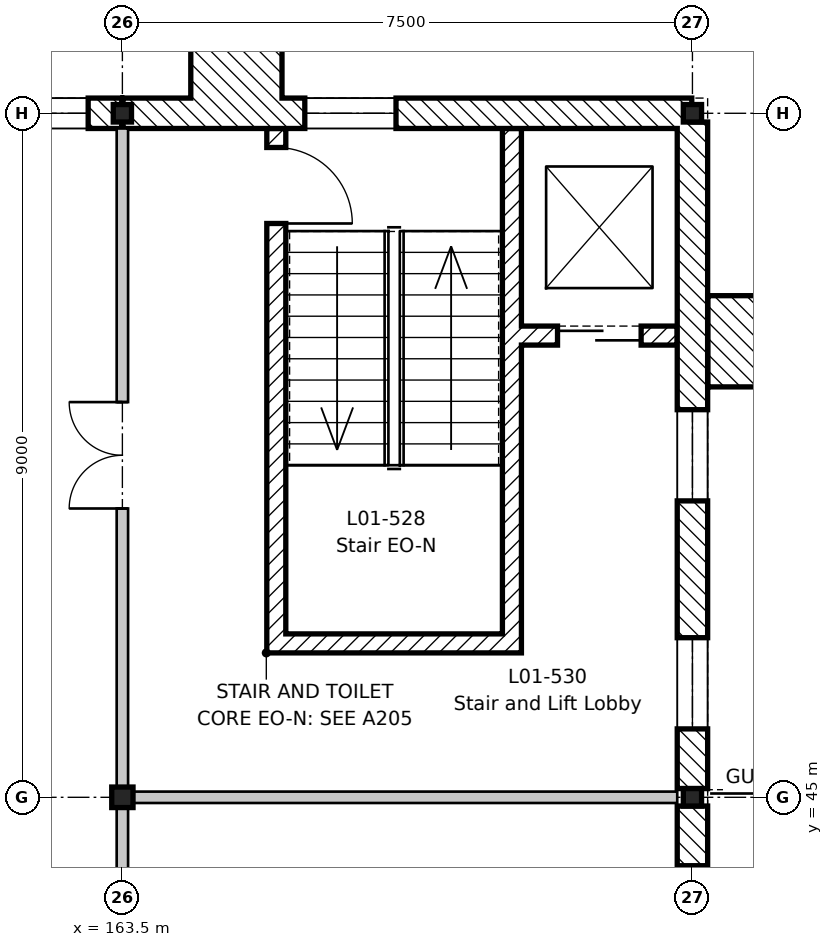
"""IFC4 building model, lengths in metres.
Left out: names, types, materials, properties, quantities, classifications, styles, units other than length and angle.
Written with IfcOpenShell. Run it as: python <this file> out.ifc"""

import sys

from ifc_helpers import new_model, si_unit, direction, frame, frame_2d, origin, origin_2d, place, context, subcontext, project, spatial, rectangle, i_section, extrude, element, fill, save


model = new_model("IFC4")
c1 = context("Model", 3, precision=1e-05, world=origin(), true_north=direction((0.0, 1.0)))
c2 = subcontext(c1, "Body", "Model", "MODEL_VIEW")
j1 = project(units=[si_unit("LENGTHUNIT", "METRE"), si_unit("PLANEANGLEUNIT", "RADIAN")], contexts=[c1])
p1 = place(None, origin())
s1 = spatial("IfcSite", under=j1, at=p1, CompositionType="ELEMENT")
p2 = place(p1, origin())
s2 = spatial("IfcBuilding", under=s1, at=p2, CompositionType="ELEMENT")
p3 = place(p2, frame((0.0, 0.0, 5.4)))
s3 = spatial("IfcBuildingStorey", under=s2, at=p3, CompositionType="ELEMENT", Elevation=5.4)
p4 = place(p3, frame((163.5, 45.0, -0.2), z_axis=(0.0, 0.0, 1.0), x_axis=(1.0, 0.0, 0.0)))
e1 = element("IfcColumn", 1, at=p4, inside=s3, PredefinedType="COLUMN", context=c2, shape_type="SweptSolid", body=[
    extrude(i_section(OverallWidth=0.28, OverallDepth=0.27, WebThickness=0.008, FlangeThickness=0.013, FilletRadius=0.024, at=origin_2d()), origin(), (0.0, 0.0, 1.0), 4.5),
])
for number, where, z_axis, x_axis in (
    (2, (163.5, 54.0, -0.2), (0.0, 0.0, 1.0), (1.0, 0.0, 0.0)),
    (3, (171.0, 45.0, -0.2), (0.0, 0.0, 1.0), (1.0, 0.0, 0.0)),
    (4, (171.0, 54.0, -0.2), (0.0, 0.0, 1.0), (1.0, 0.0, 0.0)),
):
    element("IfcColumn", number, at=place(p3, frame(where, z_axis=z_axis, x_axis=x_axis)), inside=s3, PredefinedType="COLUMN", context=c2, shape_type="SweptSolid", body=[
        extrude(i_section(OverallWidth=0.24, OverallDepth=0.23, WebThickness=0.008, FlangeThickness=0.012, FilletRadius=0.021, at=origin_2d()), origin(), (0.0, 0.0, 1.0), 4.5),
    ])
p5 = place(p3, frame((168.625, 46.9, 0.0), z_axis=(0.0, 0.0, 1.0), x_axis=(0.0, 1.0, 0.0)))
e5 = element("IfcWall", 5, at=p5, inside=s3, PredefinedType="SHEAR", context=c2, shape_type="SweptSolid", body=[
    extrude(rectangle(XDim=6.9, YDim=0.25, at=frame_2d((3.45, 0.0))), origin(), (0.0, 0.0, 1.0), 4.3),
])
p6 = place(p3, frame((165.525, 46.9, 0.0), z_axis=(0.0, 0.0, 1.0), x_axis=(0.0, 1.0, 0.0)))
e6 = element("IfcWall", 6, at=p6, inside=s3, PredefinedType="SHEAR", context=c2, shape_type="SweptSolid", body=[
    extrude(rectangle(XDim=6.9, YDim=0.25, at=frame_2d((3.45, 0.0))), origin(), (0.0, 0.0, 1.0), 4.3),
])
p7 = place(p6, frame((5.65, 0.0, 0.0)))
e7 = element("IfcOpeningElement", 7, at=p7, cuts=e6, PredefinedType="OPENING", context=c2, shape_type="SweptSolid", body=[
    extrude(rectangle(XDim=1.0, YDim=2.1, at=frame_2d((0.5, 1.05))), frame((0.0, 0.135, 0.0), z_axis=(0.0, -1.0, 0.0), x_axis=(1.0, 0.0, 0.0)), (0.0, 0.0, 1.0), 0.27),
])
p8 = place(p3, frame((165.65, 47.025, 0.0), z_axis=(0.0, 0.0, 1.0), x_axis=(1.0, 0.0, 0.0)))
e8 = element("IfcWall", 8, at=p8, inside=s3, PredefinedType="SHEAR", context=c2, shape_type="SweptSolid", body=[
    extrude(rectangle(XDim=2.85, YDim=0.25, at=frame_2d((1.425, 0.0))), origin(), (0.0, 0.0, 1.0), 4.3),
])
p9 = place(p3, frame((168.75, 51.075, 0.0), z_axis=(0.0, 0.0, 1.0), x_axis=(1.0, 0.0, 0.0)))
e9 = element("IfcWall", 9, at=p9, inside=s3, PredefinedType="SHEAR", context=c2, shape_type="SweptSolid", body=[
    extrude(rectangle(XDim=2.05, YDim=0.25, at=frame_2d((1.025, 0.0))), origin(), (0.0, 0.0, 1.0), 4.3),
])
p10 = place(p9, frame((0.475, 0.0, 0.0)))
e10 = element("IfcOpeningElement", 10, at=p10, cuts=e9, PredefinedType="OPENING", context=c2, shape_type="SweptSolid", body=[
    extrude(rectangle(XDim=1.1, YDim=2.1, at=frame_2d((0.55, 1.05))), frame((0.0, 0.135, 0.0), z_axis=(0.0, -1.0, 0.0), x_axis=(1.0, 0.0, 0.0)), (0.0, 0.0, 1.0), 0.27),
])
p11 = place(p3, frame((160.509, 54.0, 0.0), z_axis=(0.0, 0.0, 1.0), x_axis=(1.0, 0.0, 0.0)))
e11 = element("IfcWall", 11, at=p11, inside=s3, PredefinedType="STANDARD", context=c2, shape_type="SweptSolid", body=[
    extrude(rectangle(XDim=2.982, YDim=0.4, at=frame_2d((1.491, 0.0))), origin(), (0.0, 0.0, 1.0), 4.1),
])
p12 = place(p11, frame((0.441, 0.0, 0.9)))
e12 = element("IfcOpeningElement", 12, at=p12, cuts=e11, PredefinedType="OPENING", context=c2, shape_type="SweptSolid", body=[
    extrude(rectangle(XDim=2.1, YDim=2.1, at=frame_2d((1.05, 1.05))), frame((0.0, 0.21, 0.0), z_axis=(0.0, -1.0, 0.0), x_axis=(1.0, 0.0, 0.0)), (0.0, 0.0, 1.0), 0.42),
])
p13 = place(p3, frame((163.509, 54.0, 0.0), z_axis=(0.0, 0.0, 1.0), x_axis=(1.0, 0.0, 0.0)))
e13 = element("IfcWall", 13, at=p13, inside=s3, PredefinedType="STANDARD", context=c2, shape_type="SweptSolid", body=[
    extrude(rectangle(XDim=7.482, YDim=0.4, at=frame_2d((3.741, 0.0))), origin(), (0.0, 0.0, 1.0), 3.97),
])
p14 = place(p13, frame((2.391, 0.0, 0.9)))
e14 = element("IfcOpeningElement", 14, at=p14, cuts=e13, PredefinedType="OPENING", context=c2, shape_type="SweptSolid", body=[
    extrude(rectangle(XDim=1.2, YDim=2.7, at=frame_2d((0.6, 1.35))), frame((0.0, 0.21, 0.0), z_axis=(0.0, -1.0, 0.0), x_axis=(1.0, 0.0, 0.0)), (0.0, 0.0, 1.0), 0.42),
])
p15 = place(p3, frame((171.0, 44.885, 0.0), z_axis=(0.0, 0.0, 1.0), x_axis=(0.0, -1.0, 0.0)))
e15 = element("IfcWall", 15, at=p15, inside=s3, PredefinedType="STANDARD", context=c2, shape_type="SweptSolid", body=[
    extrude(rectangle(XDim=8.77, YDim=0.4, at=frame_2d((4.385, 0.0))), origin(), (0.0, 0.0, 1.0), 3.9),
])
p16 = place(p15, frame((6.785, 0.0, 0.9)))
e16 = element("IfcOpeningElement", 16, at=p16, cuts=e15, PredefinedType="OPENING", context=c2, shape_type="SweptSolid", body=[
    extrude(rectangle(XDim=1.2, YDim=2.4, at=frame_2d((0.6, 1.2))), frame((0.0, 0.21, 0.0), z_axis=(0.0, -1.0, 0.0), x_axis=(1.0, 0.0, 0.0)), (0.0, 0.0, 1.0), 0.42),
])
p17 = place(p15, frame((3.785, 0.0, 0.9)))
e17 = element("IfcOpeningElement", 17, at=p17, cuts=e15, PredefinedType="OPENING", context=c2, shape_type="SweptSolid", body=[
    extrude(rectangle(XDim=1.2, YDim=2.4, at=frame_2d((0.6, 1.2))), frame((0.0, 0.21, 0.0), z_axis=(0.0, -1.0, 0.0), x_axis=(1.0, 0.0, 0.0)), (0.0, 0.0, 1.0), 0.42),
])
p18 = place(p15, frame((0.785, 0.0, 0.9)))
e18 = element("IfcOpeningElement", 18, at=p18, cuts=e15, PredefinedType="OPENING", context=c2, shape_type="SweptSolid", body=[
    extrude(rectangle(XDim=1.2, YDim=2.4, at=frame_2d((0.6, 1.2))), frame((0.0, 0.21, 0.0), z_axis=(0.0, -1.0, 0.0), x_axis=(1.0, 0.0, 0.0)), (0.0, 0.0, 1.0), 0.42),
])
p19 = place(p3, frame((171.0, 53.885, 0.0), z_axis=(0.0, 0.0, 1.0), x_axis=(0.0, -1.0, 0.0)))
e19 = element("IfcWall", 19, at=p19, inside=s3, PredefinedType="STANDARD", context=c2, shape_type="SweptSolid", body=[
    extrude(rectangle(XDim=8.77, YDim=0.4, at=frame_2d((4.385, 0.0))), origin(), (0.0, 0.0, 1.0), 3.9),
])
p20 = place(p19, frame((6.785, 0.0, 0.9)))
e20 = element("IfcOpeningElement", 20, at=p20, cuts=e19, PredefinedType="OPENING", context=c2, shape_type="SweptSolid", body=[
    extrude(rectangle(XDim=1.2, YDim=2.4, at=frame_2d((0.6, 1.2))), frame((0.0, 0.21, 0.0), z_axis=(0.0, -1.0, 0.0), x_axis=(1.0, 0.0, 0.0)), (0.0, 0.0, 1.0), 0.42),
])
p21 = place(p19, frame((3.785, 0.0, 0.9)))
e21 = element("IfcOpeningElement", 21, at=p21, cuts=e19, PredefinedType="OPENING", context=c2, shape_type="SweptSolid", body=[
    extrude(rectangle(XDim=1.2, YDim=2.4, at=frame_2d((0.6, 1.2))), frame((0.0, 0.21, 0.0), z_axis=(0.0, -1.0, 0.0), x_axis=(1.0, 0.0, 0.0)), (0.0, 0.0, 1.0), 0.42),
])
for number, where, z_axis, x_axis in (
    (22, (164.4, 54.8, 0.0), (0.0, 0.0, 1.0), (1.0, 0.0, 0.0)),
    (23, (171.8, 50.4, 0.0), (0.0, 0.0, 1.0), (0.0, 1.0, 0.0)),
):
    element("IfcWall", number, at=place(p3, frame(where, z_axis=z_axis, x_axis=x_axis)), inside=s3, PredefinedType="STANDARD", context=c2, shape_type="SweptSolid", body=[
        extrude(rectangle(XDim=1.2, YDim=1.2, at=frame_2d((0.6, 0.0))), origin(), (0.0, 0.0, 1.0), 4.5),
    ])
p22 = place(p3, frame((163.575, 45.0, 0.0), z_axis=(0.0, 0.0, 1.0), x_axis=(1.0, 0.0, 0.0)))
e24 = element("IfcWall", 24, at=p22, inside=s3, PredefinedType="PARTITIONING", context=c2, shape_type="SweptSolid", body=[
    extrude(rectangle(XDim=7.225, YDim=0.15, at=frame_2d((3.613, 0.0))), origin(), (0.0, 0.0, 1.0), 3.95),
])
p23 = place(p3, frame((163.5, -8.8, 0.0), z_axis=(0.0, 0.0, 1.0), x_axis=(0.0, 1.0, 0.0)))
e25 = element("IfcWall", 25, at=p23, inside=s3, PredefinedType="PARTITIONING", context=c2, shape_type="SweptSolid", body=[
    extrude(rectangle(XDim=62.6, YDim=0.15, at=frame_2d((31.3, 0.0))), origin(), (0.0, 0.0, 1.0), 3.78),
])
p24 = place(p23, frame((18.8, 0.0, 0.0)))
e26 = element("IfcOpeningElement", 26, at=p24, cuts=e25, PredefinedType="OPENING", context=c2, shape_type="SweptSolid", body=[
    extrude(rectangle(XDim=1.0, YDim=2.1, at=frame_2d((0.5, 1.05))), frame((0.0, 0.085, 0.0), z_axis=(0.0, -1.0, 0.0), x_axis=(1.0, 0.0, 0.0)), (0.0, 0.0, 1.0), 0.17),
])
p25 = place(p23, frame((23.3, 0.0, 0.0)))
e27 = element("IfcOpeningElement", 27, at=p25, cuts=e25, PredefinedType="OPENING", context=c2, shape_type="SweptSolid", body=[
    extrude(rectangle(XDim=1.0, YDim=2.1, at=frame_2d((0.5, 1.05))), frame((0.0, 0.085, 0.0), z_axis=(0.0, -1.0, 0.0), x_axis=(1.0, 0.0, 0.0)), (0.0, 0.0, 1.0), 0.17),
])
p26 = place(p23, frame((29.3, 0.0, 0.0)))
e28 = element("IfcOpeningElement", 28, at=p26, cuts=e25, PredefinedType="OPENING", context=c2, shape_type="SweptSolid", body=[
    extrude(rectangle(XDim=1.0, YDim=2.1, at=frame_2d((0.5, 1.05))), frame((0.0, 0.085, 0.0), z_axis=(0.0, -1.0, 0.0), x_axis=(1.0, 0.0, 0.0)), (0.0, 0.0, 1.0), 0.17),
])
p27 = place(p23, frame((33.8, 0.0, 0.0)))
e29 = element("IfcOpeningElement", 29, at=p27, cuts=e25, PredefinedType="OPENING", context=c2, shape_type="SweptSolid", body=[
    extrude(rectangle(XDim=1.0, YDim=2.1, at=frame_2d((0.5, 1.05))), frame((0.0, 0.085, 0.0), z_axis=(0.0, -1.0, 0.0), x_axis=(1.0, 0.0, 0.0)), (0.0, 0.0, 1.0), 0.17),
])
p28 = place(p23, frame((45.8, 0.0, 0.0)))
e30 = element("IfcOpeningElement", 30, at=p28, cuts=e25, PredefinedType="OPENING", context=c2, shape_type="SweptSolid", body=[
    extrude(rectangle(XDim=1.0, YDim=2.1, at=frame_2d((0.5, 1.05))), frame((0.0, 0.085, 0.0), z_axis=(0.0, -1.0, 0.0), x_axis=(1.0, 0.0, 0.0)), (0.0, 0.0, 1.0), 0.17),
])
p29 = place(p23, frame((48.8, 0.0, 0.0)))
e31 = element("IfcOpeningElement", 31, at=p29, cuts=e25, PredefinedType="OPENING", context=c2, shape_type="SweptSolid", body=[
    extrude(rectangle(XDim=1.0, YDim=2.1, at=frame_2d((0.5, 1.05))), frame((0.0, 0.085, 0.0), z_axis=(0.0, -1.0, 0.0), x_axis=(1.0, 0.0, 0.0)), (0.0, 0.0, 1.0), 0.17),
])
p30 = place(p23, frame((51.8, 0.0, 0.0)))
e32 = element("IfcOpeningElement", 32, at=p30, cuts=e25, PredefinedType="OPENING", context=c2, shape_type="SweptSolid", body=[
    extrude(rectangle(XDim=1.0, YDim=2.1, at=frame_2d((0.5, 1.05))), frame((0.0, 0.085, 0.0), z_axis=(0.0, -1.0, 0.0), x_axis=(1.0, 0.0, 0.0)), (0.0, 0.0, 1.0), 0.17),
])
p31 = place(p23, frame((12.6, 0.0, 0.0)))
e33 = element("IfcOpeningElement", 33, at=p31, cuts=e25, PredefinedType="OPENING", context=c2, shape_type="SweptSolid", body=[
    extrude(rectangle(XDim=1.4, YDim=2.1, at=frame_2d((0.7, 1.05))), frame((0.0, 0.085, 0.0), z_axis=(0.0, -1.0, 0.0), x_axis=(1.0, 0.0, 0.0)), (0.0, 0.0, 1.0), 0.17),
])
p32 = place(p23, frame((3.6, 0.0, 0.0)))
e34 = element("IfcOpeningElement", 34, at=p32, cuts=e25, PredefinedType="OPENING", context=c2, shape_type="SweptSolid", body=[
    extrude(rectangle(XDim=1.4, YDim=2.1, at=frame_2d((0.7, 1.05))), frame((0.0, 0.085, 0.0), z_axis=(0.0, -1.0, 0.0), x_axis=(1.0, 0.0, 0.0)), (0.0, 0.0, 1.0), 0.17),
])
p33 = place(p23, frame((57.6, 0.0, 0.0)))
e35 = element("IfcOpeningElement", 35, at=p33, cuts=e25, PredefinedType="OPENING", context=c2, shape_type="SweptSolid", body=[
    extrude(rectangle(XDim=1.4, YDim=2.1, at=frame_2d((0.7, 1.05))), frame((0.0, 0.085, 0.0), z_axis=(0.0, -1.0, 0.0), x_axis=(1.0, 0.0, 0.0)), (0.0, 0.0, 1.0), 0.17),
])
p34 = place(p23, frame((36.75, 0.0, 0.0)))
e36 = element("IfcOpeningElement", 36, at=p34, cuts=e25, PredefinedType="OPENING", context=c2, shape_type="SweptSolid", body=[
    extrude(rectangle(XDim=1.0, YDim=2.1, at=frame_2d((0.5, 1.05))), frame((0.0, 0.085, 0.0), z_axis=(0.0, -1.0, 0.0), x_axis=(1.0, 0.0, 0.0)), (0.0, 0.0, 1.0), 0.17),
])
p35 = place(p23, frame((42.65, 0.0, 0.0)))
e37 = element("IfcOpeningElement", 37, at=p35, cuts=e25, PredefinedType="OPENING", context=c2, shape_type="SweptSolid", body=[
    extrude(rectangle(XDim=1.4, YDim=2.1, at=frame_2d((0.7, 1.05))), frame((0.0, 0.085, 0.0), z_axis=(0.0, -1.0, 0.0), x_axis=(1.0, 0.0, 0.0)), (0.0, 0.0, 1.0), 0.17),
])
p36 = place(p12, origin())
e38 = element("IfcWindow", 38, at=p36, inside=s3, PartitioningType="SINGLE_PANEL", PredefinedType="WINDOW", context=c2, shape_type="SweptSolid", body=[
    extrude(rectangle(XDim=2.1, YDim=2.1, at=frame_2d((1.05, 1.05))), frame((0.0, -0.12, 0.0), z_axis=(0.0, -1.0, 0.0), x_axis=(1.0, 0.0, 0.0)), (0.0, 0.0, 1.0), 0.06),
])
fill(e12, e38)
p37 = place(p14, origin())
e39 = element("IfcWindow", 39, at=p37, inside=s3, PartitioningType="SINGLE_PANEL", PredefinedType="WINDOW", context=c2, shape_type="SweptSolid", body=[
    extrude(rectangle(XDim=1.2, YDim=2.7, at=frame_2d((0.6, 1.35))), frame((0.0, -0.12, 0.0), z_axis=(0.0, -1.0, 0.0), x_axis=(1.0, 0.0, 0.0)), (0.0, 0.0, 1.0), 0.06),
])
fill(e14, e39)
p38 = place(p18, origin())
e40 = element("IfcWindow", 40, at=p38, inside=s3, PartitioningType="SINGLE_PANEL", PredefinedType="WINDOW", context=c2, shape_type="SweptSolid", body=[
    extrude(rectangle(XDim=1.2, YDim=2.4, at=frame_2d((0.6, 1.2))), frame((0.0, -0.12, 0.0), z_axis=(0.0, -1.0, 0.0), x_axis=(1.0, 0.0, 0.0)), (0.0, 0.0, 1.0), 0.06),
])
fill(e18, e40)
p39 = place(p20, origin())
e41 = element("IfcWindow", 41, at=p39, inside=s3, PartitioningType="SINGLE_PANEL", PredefinedType="WINDOW", context=c2, shape_type="SweptSolid", body=[
    extrude(rectangle(XDim=1.2, YDim=2.4, at=frame_2d((0.6, 1.2))), frame((0.0, -0.12, 0.0), z_axis=(0.0, -1.0, 0.0), x_axis=(1.0, 0.0, 0.0)), (0.0, 0.0, 1.0), 0.06),
])
fill(e20, e41)
p40 = place(p21, origin())
e42 = element("IfcWindow", 42, at=p40, inside=s3, PartitioningType="SINGLE_PANEL", PredefinedType="WINDOW", context=c2, shape_type="SweptSolid", body=[
    extrude(rectangle(XDim=1.2, YDim=2.4, at=frame_2d((0.6, 1.2))), frame((0.0, -0.12, 0.0), z_axis=(0.0, -1.0, 0.0), x_axis=(1.0, 0.0, 0.0)), (0.0, 0.0, 1.0), 0.06),
])
fill(e21, e42)
p41 = place(p7, frame((1.0, 0.0, 0.0), z_axis=(0.0, 0.0, 1.0), x_axis=(-1.0, 0.0, 0.0)))
e43 = element("IfcDoor", 43, at=p41, inside=s3, OperationType="SINGLE_SWING_RIGHT", PredefinedType="DOOR", context=c2, shape_type="SweptSolid", body=[
    extrude(rectangle(XDim=1.0, YDim=2.1, at=frame_2d((0.5, 1.05))), frame((0.0, 0.025, 0.0), z_axis=(0.0, -1.0, 0.0), x_axis=(1.0, 0.0, 0.0)), (0.0, 0.0, 1.0), 0.05),
])
fill(e7, e43)
p42 = place(p33, origin())
e44 = element("IfcDoor", 44, at=p42, inside=s3, OperationType="DOUBLE_DOOR_SINGLE_SWING", PredefinedType="DOOR", context=c2, shape_type="SweptSolid", body=[
    extrude(rectangle(XDim=1.4, YDim=2.1, at=frame_2d((0.7, 1.05))), frame((0.0, 0.025, 0.0), z_axis=(0.0, -1.0, 0.0), x_axis=(1.0, 0.0, 0.0)), (0.0, 0.0, 1.0), 0.05),
])
fill(e35, e44)
p43 = place(p10, origin())
e45 = element("IfcDoor", 45, at=p43, inside=s3, OperationType="SLIDING_TO_LEFT", PredefinedType="DOOR", context=c2, shape_type="SweptSolid", body=[
    extrude(rectangle(XDim=1.1, YDim=2.1, at=frame_2d((0.55, 1.05))), frame((0.0, 0.025, 0.0), z_axis=(0.0, -1.0, 0.0), x_axis=(1.0, 0.0, 0.0)), (0.0, 0.0, 1.0), 0.05),
])
fill(e10, e45)
save(model, sys.argv[1])
